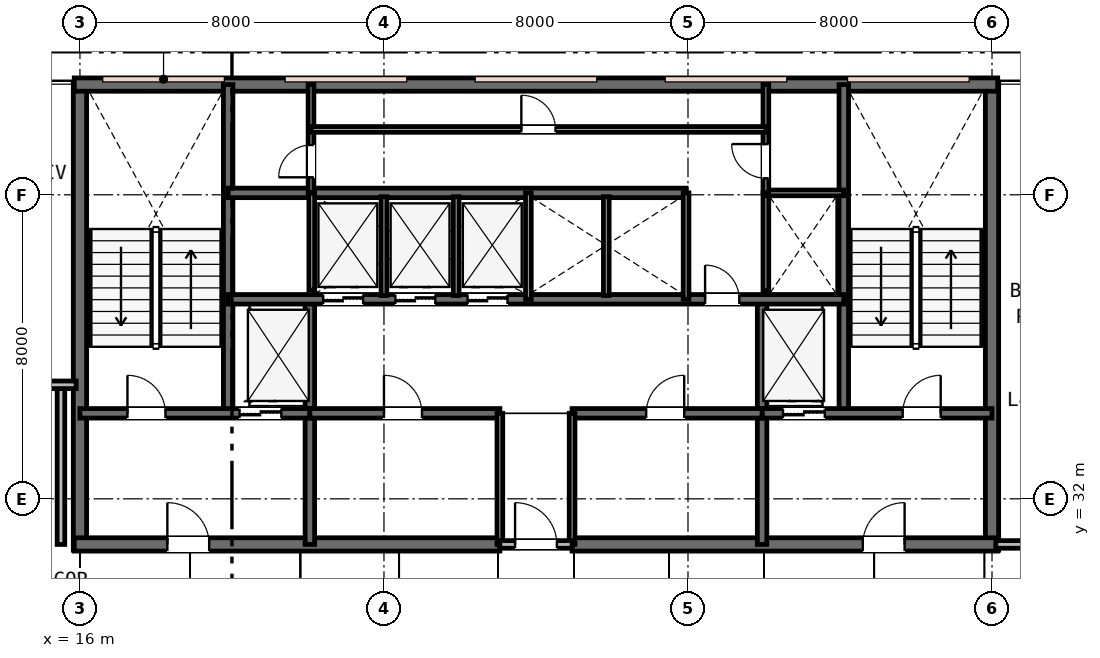
"""IFC4 building model, lengths in metres.
Left out: names, types, materials, properties, quantities, classifications, styles, units other than length and angle.
Written with IfcOpenShell. Run it as: python <this file> out.ifc"""

import sys

from ifc_helpers import new_model, si_unit, direction, frame, frame_2d, origin, place, context, subcontext, project, spatial, rectangle, extrude, element, fill, save


model = new_model("IFC4")
c1 = context("Model", 3, precision=1e-05, world=origin(), true_north=direction((0.0, 1.0)))
c2 = subcontext(c1, "Body", "Model", "MODEL_VIEW")
j1 = project(units=[si_unit("LENGTHUNIT", "METRE"), si_unit("PLANEANGLEUNIT", "RADIAN")], contexts=[c1])
p1 = place(None, origin())
s1 = spatial("IfcSite", under=j1, at=p1, CompositionType="ELEMENT")
p2 = place(p1, origin())
s2 = spatial("IfcBuilding", under=s1, at=p2, CompositionType="ELEMENT")
p3 = place(p2, frame((0.0, 0.0, 172.2)))
s3 = spatial("IfcBuildingStorey", under=s2, at=p3, CompositionType="ELEMENT", Elevation=172.2)
for number, where, z_axis, x_axis in (
    (1, (16.0, 30.65, 0.0), (0.0, 0.0, 1.0), (0.0, 1.0, 0.0)),
    (2, (40.0, 30.65, 0.0), (0.0, 0.0, 1.0), (0.0, 1.0, 0.0)),
):
    element("IfcWall", number, at=place(p3, frame(where, z_axis=z_axis, x_axis=x_axis)), inside=s3, PredefinedType="SHEAR", context=c2, shape_type="SweptSolid", body=[
        extrude(rectangle(XDim=12.3, YDim=0.35, at=frame_2d((6.15, 0.0))), origin(), (0.0, 0.0, 1.0), 3.6),
    ])
p4 = place(p3, frame((15.85, 42.9, 0.0), z_axis=(0.0, 0.0, 1.0), x_axis=(1.0, 0.0, 0.0)))
e3 = element("IfcWall", 3, at=p4, inside=s3, PredefinedType="SHEAR", context=c2, shape_type="SweptSolid", body=[
    extrude(rectangle(XDim=24.3, YDim=0.35, at=frame_2d((12.15, 0.0))), origin(), (0.0, 0.0, 1.0), 3.6),
])
p5 = place(p3, frame((15.85, 30.8, 0.0), z_axis=(0.0, 0.0, 1.0), x_axis=(1.0, 0.0, 0.0)))
e4 = element("IfcWall", 4, at=p5, inside=s3, PredefinedType="SHEAR", context=c2, shape_type="SweptSolid", body=[
    extrude(rectangle(XDim=11.2, YDim=0.35, at=frame_2d((5.6, 0.0))), origin(), (0.0, 0.0, 1.0), 3.6),
])
p6 = place(p5, frame((2.45, 0.0, 0.0)))
e5 = element("IfcOpeningElement", 5, at=p6, cuts=e4, PredefinedType="OPENING", context=c2, shape_type="SweptSolid", body=[
    extrude(rectangle(XDim=1.1, YDim=2.15, at=frame_2d((0.55, 1.075))), frame((0.0, 0.185, 0.0), z_axis=(0.0, -1.0, 0.0), x_axis=(1.0, 0.0, 0.0)), (0.0, 0.0, 1.0), 0.37),
])
p7 = place(p3, frame((28.95, 30.8, 0.0), z_axis=(0.0, 0.0, 1.0), x_axis=(1.0, 0.0, 0.0)))
e6 = element("IfcWall", 6, at=p7, inside=s3, PredefinedType="SHEAR", context=c2, shape_type="SweptSolid", body=[
    extrude(rectangle(XDim=11.2, YDim=0.35, at=frame_2d((5.6, 0.0))), origin(), (0.0, 0.0, 1.0), 3.6),
])
p8 = place(p7, frame((7.65, 0.0, 0.0)))
e7 = element("IfcOpeningElement", 7, at=p8, cuts=e6, PredefinedType="OPENING", context=c2, shape_type="SweptSolid", body=[
    extrude(rectangle(XDim=1.1, YDim=2.15, at=frame_2d((0.55, 1.075))), frame((0.0, 0.185, 0.0), z_axis=(0.0, -1.0, 0.0), x_axis=(1.0, 0.0, 0.0)), (0.0, 0.0, 1.0), 0.37),
])
for number, where, z_axis, x_axis in (
    (8, (19.9, 34.25, 0.0), (0.0, 0.0, 1.0), (0.0, 1.0, 0.0)),
    (9, (36.1, 34.25, 0.0), (0.0, 0.0, 1.0), (0.0, 1.0, 0.0)),
):
    element("IfcWall", number, at=place(p3, frame(where, z_axis=z_axis, x_axis=x_axis)), inside=s3, PredefinedType="SHEAR", context=c2, shape_type="SweptSolid", body=[
        extrude(rectangle(XDim=8.65, YDim=0.25, at=frame_2d((4.325, 0.0))), origin(), (0.0, 0.0, 1.0), 3.6),
    ])
for number, where, z_axis, x_axis in (
    (10, (22.05, 30.8, 0.0), (0.0, 0.0, 1.0), (0.0, 1.0, 0.0)),
    (11, (33.95, 30.8, 0.0), (0.0, 0.0, 1.0), (0.0, 1.0, 0.0)),
):
    element("IfcWall", number, at=place(p3, frame(where, z_axis=z_axis, x_axis=x_axis)), inside=s3, PredefinedType="SHEAR", context=c2, shape_type="SweptSolid", body=[
        extrude(rectangle(XDim=6.45, YDim=0.25, at=frame_2d((3.225, 0.0))), origin(), (0.0, 0.0, 1.0), 3.6),
    ])
p9 = place(p3, frame((16.0, 34.25, 0.0), z_axis=(0.0, 0.0, 1.0), x_axis=(1.0, 0.0, 0.0)))
e12 = element("IfcWall", 12, at=p9, inside=s3, PredefinedType="SHEAR", context=c2, shape_type="SweptSolid", body=[
    extrude(rectangle(XDim=6.05, YDim=0.25, at=frame_2d((3.025, 0.0))), origin(), (0.0, 0.0, 1.0), 3.6),
])
p10 = place(p9, frame((1.25, 0.0, 0.0)))
e13 = element("IfcOpeningElement", 13, at=p10, cuts=e12, PredefinedType="OPENING", context=c2, shape_type="SweptSolid", body=[
    extrude(rectangle(XDim=1.0, YDim=2.15, at=frame_2d((0.5, 1.075))), frame((0.0, 0.135, 0.0), z_axis=(0.0, -1.0, 0.0), x_axis=(1.0, 0.0, 0.0)), (0.0, 0.0, 1.0), 0.27),
])
p11 = place(p9, frame((4.2, 0.0, 0.0)))
e14 = element("IfcOpeningElement", 14, at=p11, cuts=e12, PredefinedType="OPENING", context=c2, shape_type="SweptSolid", body=[
    extrude(rectangle(XDim=1.1, YDim=2.15, at=frame_2d((0.55, 1.075))), frame((0.0, 0.135, 0.0), z_axis=(0.0, -1.0, 0.0), x_axis=(1.0, 0.0, 0.0)), (0.0, 0.0, 1.0), 0.27),
])
p12 = place(p3, frame((33.95, 34.25, 0.0), z_axis=(0.0, 0.0, 1.0), x_axis=(1.0, 0.0, 0.0)))
e15 = element("IfcWall", 15, at=p12, inside=s3, PredefinedType="SHEAR", context=c2, shape_type="SweptSolid", body=[
    extrude(rectangle(XDim=6.05, YDim=0.25, at=frame_2d((3.025, 0.0))), origin(), (0.0, 0.0, 1.0), 3.6),
])
p13 = place(p12, frame((3.7, 0.0, 0.0)))
e16 = element("IfcOpeningElement", 16, at=p13, cuts=e15, PredefinedType="OPENING", context=c2, shape_type="SweptSolid", body=[
    extrude(rectangle(XDim=1.0, YDim=2.15, at=frame_2d((0.5, 1.075))), frame((0.0, 0.135, 0.0), z_axis=(0.0, -1.0, 0.0), x_axis=(1.0, 0.0, 0.0)), (0.0, 0.0, 1.0), 0.27),
])
p14 = place(p12, frame((0.55, 0.0, 0.0)))
e17 = element("IfcOpeningElement", 17, at=p14, cuts=e15, PredefinedType="OPENING", context=c2, shape_type="SweptSolid", body=[
    extrude(rectangle(XDim=1.1, YDim=2.15, at=frame_2d((0.55, 1.075))), frame((0.0, 0.135, 0.0), z_axis=(0.0, -1.0, 0.0), x_axis=(1.0, 0.0, 0.0)), (0.0, 0.0, 1.0), 0.27),
])
p15 = place(p3, frame((22.05, 34.25, 0.0), z_axis=(0.0, 0.0, 1.0), x_axis=(1.0, 0.0, 0.0)))
e18 = element("IfcWall", 18, at=p15, inside=s3, PredefinedType="SHEAR", context=c2, shape_type="SweptSolid", body=[
    extrude(rectangle(XDim=5.0, YDim=0.25, at=frame_2d((2.5, 0.0))), origin(), (0.0, 0.0, 1.0), 3.6),
])
p16 = place(p15, frame((1.95, 0.0, 0.0)))
e19 = element("IfcOpeningElement", 19, at=p16, cuts=e18, PredefinedType="OPENING", context=c2, shape_type="SweptSolid", body=[
    extrude(rectangle(XDim=1.0, YDim=2.15, at=frame_2d((0.5, 1.075))), frame((0.0, 0.135, 0.0), z_axis=(0.0, -1.0, 0.0), x_axis=(1.0, 0.0, 0.0)), (0.0, 0.0, 1.0), 0.27),
])
p17 = place(p3, frame((28.95, 34.25, 0.0), z_axis=(0.0, 0.0, 1.0), x_axis=(1.0, 0.0, 0.0)))
e20 = element("IfcWall", 20, at=p17, inside=s3, PredefinedType="SHEAR", context=c2, shape_type="SweptSolid", body=[
    extrude(rectangle(XDim=5.0, YDim=0.25, at=frame_2d((2.5, 0.0))), origin(), (0.0, 0.0, 1.0), 3.6),
])
p18 = place(p17, frame((1.95, 0.0, 0.0)))
e21 = element("IfcOpeningElement", 21, at=p18, cuts=e20, PredefinedType="OPENING", context=c2, shape_type="SweptSolid", body=[
    extrude(rectangle(XDim=1.0, YDim=2.15, at=frame_2d((0.5, 1.075))), frame((0.0, 0.135, 0.0), z_axis=(0.0, -1.0, 0.0), x_axis=(1.0, 0.0, 0.0)), (0.0, 0.0, 1.0), 0.27),
])
p19 = place(p3, frame((19.9, 37.25, 0.0), z_axis=(0.0, 0.0, 1.0), x_axis=(1.0, 0.0, 0.0)))
e22 = element("IfcWall", 22, at=p19, inside=s3, PredefinedType="SHEAR", context=c2, shape_type="SweptSolid", body=[
    extrude(rectangle(XDim=16.2, YDim=0.25, at=frame_2d((8.1, 0.0))), origin(), (0.0, 0.0, 1.0), 3.6),
])
p20 = place(p19, frame((12.55, 0.0, 0.0)))
e23 = element("IfcOpeningElement", 23, at=p20, cuts=e22, PredefinedType="OPENING", context=c2, shape_type="SweptSolid", body=[
    extrude(rectangle(XDim=0.9, YDim=2.15, at=frame_2d((0.45, 1.075))), frame((0.0, 0.135, 0.0), z_axis=(0.0, -1.0, 0.0), x_axis=(1.0, 0.0, 0.0)), (0.0, 0.0, 1.0), 0.27),
])
p21 = place(p19, frame((2.5, 0.0, 0.0)))
e24 = element("IfcOpeningElement", 24, at=p21, cuts=e22, PredefinedType="OPENING", context=c2, shape_type="SweptSolid", body=[
    extrude(rectangle(XDim=1.05, YDim=2.15, at=frame_2d((0.525, 1.075))), frame((0.0, 0.135, 0.0), z_axis=(0.0, -1.0, 0.0), x_axis=(1.0, 0.0, 0.0)), (0.0, 0.0, 1.0), 0.27),
])
p22 = place(p19, frame((4.4, 0.0, 0.0)))
e25 = element("IfcOpeningElement", 25, at=p22, cuts=e22, PredefinedType="OPENING", context=c2, shape_type="SweptSolid", body=[
    extrude(rectangle(XDim=1.05, YDim=2.15, at=frame_2d((0.525, 1.075))), frame((0.0, 0.135, 0.0), z_axis=(0.0, -1.0, 0.0), x_axis=(1.0, 0.0, 0.0)), (0.0, 0.0, 1.0), 0.27),
])
p23 = place(p19, frame((6.3, 0.0, 0.0)))
e26 = element("IfcOpeningElement", 26, at=p23, cuts=e22, PredefinedType="OPENING", context=c2, shape_type="SweptSolid", body=[
    extrude(rectangle(XDim=1.05, YDim=2.15, at=frame_2d((0.525, 1.075))), frame((0.0, 0.135, 0.0), z_axis=(0.0, -1.0, 0.0), x_axis=(1.0, 0.0, 0.0)), (0.0, 0.0, 1.0), 0.27),
])
p24 = place(p3, frame((19.9, 40.05, 0.0), z_axis=(0.0, 0.0, 1.0), x_axis=(1.0, 0.0, 0.0)))
e27 = element("IfcWall", 27, at=p24, inside=s3, PredefinedType="SHEAR", context=c2, shape_type="SweptSolid", body=[
    extrude(rectangle(XDim=12.05, YDim=0.25, at=frame_2d((6.025, 0.0))), origin(), (0.0, 0.0, 1.0), 3.6),
])
for number, where, z_axis, x_axis in (
    (28, (27.05, 30.8, 0.0), (0.0, 0.0, 1.0), (0.0, 1.0, 0.0)),
    (29, (28.95, 30.8, 0.0), (0.0, 0.0, 1.0), (0.0, 1.0, 0.0)),
):
    element("IfcWall", number, at=place(p3, frame(where, z_axis=z_axis, x_axis=x_axis)), inside=s3, PredefinedType="PLUMBINGWALL", context=c2, shape_type="SweptSolid", body=[
        extrude(rectangle(XDim=3.45, YDim=0.15, at=frame_2d((1.725, 0.0))), origin(), (0.0, 0.0, 1.0), 3.07),
    ])
p25 = place(p3, frame((27.05, 30.8, 0.0), z_axis=(0.0, 0.0, 1.0), x_axis=(1.0, 0.0, 0.0)))
e30 = element("IfcWall", 30, at=p25, inside=s3, PredefinedType="PARTITIONING", context=c2, shape_type="SweptSolid", body=[
    extrude(rectangle(XDim=1.9, YDim=0.2, at=frame_2d((0.95, 0.0))), origin(), (0.0, 0.0, 1.0), 3.07),
])
p26 = place(p25, frame((0.4, 0.0, 0.0)))
e31 = element("IfcOpeningElement", 31, at=p26, cuts=e30, PredefinedType="OPENING", context=c2, shape_type="SweptSolid", body=[
    extrude(rectangle(XDim=1.1, YDim=2.15, at=frame_2d((0.55, 1.075))), frame((0.0, 0.11, 0.0), z_axis=(0.0, -1.0, 0.0), x_axis=(1.0, 0.0, 0.0)), (0.0, 0.0, 1.0), 0.22),
])
p27 = place(p3, frame((22.1, 37.49, 0.0), z_axis=(0.0, 0.0, 1.0), x_axis=(0.0, 1.0, 0.0)))
e32 = element("IfcWall", 32, at=p27, inside=s3, PredefinedType="PLUMBINGWALL", context=c2, shape_type="SweptSolid", body=[
    extrude(rectangle(XDim=2.56, YDim=0.15, at=frame_2d((1.28, 0.0))), origin(), (0.0, 0.0, 1.0), 3.33),
])
p28 = place(p3, frame((27.8, 37.25, 0.0), z_axis=(0.0, 0.0, 1.0), x_axis=(0.0, 1.0, 0.0)))
e33 = element("IfcWall", 33, at=p28, inside=s3, PredefinedType="PLUMBINGWALL", context=c2, shape_type="SweptSolid", body=[
    extrude(rectangle(XDim=2.8, YDim=0.15, at=frame_2d((1.4, 0.0))), origin(), (0.0, 0.0, 1.0), 3.33),
])
for number, where, z_axis, x_axis in (
    (34, (24.0, 37.35, 0.0), (0.0, 0.0, 1.0), (0.0, 1.0, 0.0)),
    (35, (25.9, 37.35, 0.0), (0.0, 0.0, 1.0), (0.0, 1.0, 0.0)),
):
    element("IfcWall", number, at=place(p3, frame(where, z_axis=z_axis, x_axis=x_axis)), inside=s3, PredefinedType="PLUMBINGWALL", context=c2, shape_type="SweptSolid", body=[
        extrude(rectangle(XDim=2.6, YDim=0.15, at=frame_2d((1.3, 0.0))), origin(), (0.0, 0.0, 1.0), 3.33),
    ])
p29 = place(p3, frame((31.95, 37.25, 0.0), z_axis=(0.0, 0.0, 1.0), x_axis=(0.0, 1.0, 0.0)))
e36 = element("IfcWall", 36, at=p29, inside=s3, PredefinedType="PLUMBINGWALL", context=c2, shape_type="SweptSolid", body=[
    extrude(rectangle(XDim=2.8, YDim=0.15, at=frame_2d((1.4, 0.0))), origin(), (0.0, 0.0, 1.0), 3.33),
])
p30 = place(p3, frame((29.85, 37.35, 0.0), z_axis=(0.0, 0.0, 1.0), x_axis=(0.0, 1.0, 0.0)))
e37 = element("IfcWall", 37, at=p30, inside=s3, PredefinedType="PLUMBINGWALL", context=c2, shape_type="SweptSolid", body=[
    extrude(rectangle(XDim=2.6, YDim=0.15, at=frame_2d((1.3, 0.0))), origin(), (0.0, 0.0, 1.0), 3.33),
])
p31 = place(p3, frame((34.05, 37.473, 0.0), z_axis=(0.0, 0.0, 1.0), x_axis=(0.0, 1.0, 0.0)))
e38 = element("IfcWall", 38, at=p31, inside=s3, PredefinedType="PLUMBINGWALL", context=c2, shape_type="SweptSolid", body=[
    extrude(rectangle(XDim=2.577, YDim=0.15, at=frame_2d((1.288, 0.0))), origin(), (0.0, 0.0, 1.0), 3.33),
])
p32 = place(p3, frame((34.05, 40.05, 0.0), z_axis=(0.0, 0.0, 1.0), x_axis=(1.0, 0.0, 0.0)))
e39 = element("IfcWall", 39, at=p32, inside=s3, PredefinedType="PARTITIONING", context=c2, shape_type="SweptSolid", body=[
    extrude(rectangle(XDim=2.05, YDim=0.15, at=frame_2d((1.025, 0.0))), origin(), (0.0, 0.0, 1.0), 3.33),
])
p33 = place(p3, frame((34.05, 40.05, 0.0), z_axis=(0.0, 0.0, 1.0), x_axis=(0.0, 1.0, 0.0)))
e40 = element("IfcWall", 40, at=p33, inside=s3, PredefinedType="PARTITIONING", context=c2, shape_type="SweptSolid", body=[
    extrude(rectangle(XDim=2.85, YDim=0.15, at=frame_2d((1.425, 0.0))), origin(), (0.0, 0.0, 1.0), 3.33),
])
p34 = place(p33, frame((0.385, 0.0, 0.0)))
e41 = element("IfcOpeningElement", 41, at=p34, cuts=e40, PredefinedType="OPENING", context=c2, shape_type="SweptSolid", body=[
    extrude(rectangle(XDim=0.9, YDim=2.15, at=frame_2d((0.45, 1.075))), frame((0.0, 0.085, 0.0), z_axis=(0.0, -1.0, 0.0), x_axis=(1.0, 0.0, 0.0)), (0.0, 0.0, 1.0), 0.17),
])
p35 = place(p3, frame((22.08, 40.05, 0.0), z_axis=(0.0, 0.0, 1.0), x_axis=(0.0, 1.0, 0.0)))
e42 = element("IfcWall", 42, at=p35, inside=s3, PredefinedType="PARTITIONING", context=c2, shape_type="SweptSolid", body=[
    extrude(rectangle(XDim=2.85, YDim=0.15, at=frame_2d((1.425, 0.0))), origin(), (0.0, 0.0, 1.0), 3.33),
])
p36 = place(p35, frame((0.41, 0.0, 0.0)))
e43 = element("IfcOpeningElement", 43, at=p36, cuts=e42, PredefinedType="OPENING", context=c2, shape_type="SweptSolid", body=[
    extrude(rectangle(XDim=0.85, YDim=2.15, at=frame_2d((0.425, 1.075))), frame((0.0, 0.085, 0.0), z_axis=(0.0, -1.0, 0.0), x_axis=(1.0, 0.0, 0.0)), (0.0, 0.0, 1.0), 0.17),
])
p37 = place(p3, frame((22.08, 41.72, 0.0), z_axis=(0.0, 0.0, 1.0), x_axis=(1.0, 0.0, 0.0)))
e44 = element("IfcWall", 44, at=p37, inside=s3, PredefinedType="PARTITIONING", context=c2, shape_type="SweptSolid", body=[
    extrude(rectangle(XDim=11.97, YDim=0.15, at=frame_2d((5.985, 0.0))), origin(), (0.0, 0.0, 1.0), 3.33),
])
p38 = place(p37, frame((5.535, 0.0, 0.0)))
e45 = element("IfcOpeningElement", 45, at=p38, cuts=e44, PredefinedType="OPENING", context=c2, shape_type="SweptSolid", body=[
    extrude(rectangle(XDim=0.9, YDim=2.15, at=frame_2d((0.45, 1.075))), frame((0.0, 0.085, 0.0), z_axis=(0.0, -1.0, 0.0), x_axis=(1.0, 0.0, 0.0)), (0.0, 0.0, 1.0), 0.17),
])
p39 = place(p3, frame((15.5, 30.8, 0.0), z_axis=(0.0, 0.0, 1.0), x_axis=(0.0, 1.0, 0.0)))
e46 = element("IfcWall", 46, at=p39, inside=s3, PredefinedType="PARTITIONING", context=c2, shape_type="SweptSolid", body=[
    extrude(rectangle(XDim=4.2, YDim=0.2, at=frame_2d((2.1, 0.0))), origin(), (0.0, 0.0, 1.0), 2.92),
])
p40 = place(p3, frame((5.1, 35.0, 0.0), z_axis=(0.0, 0.0, 1.0), x_axis=(1.0, 0.0, 0.0)))
e47 = element("IfcWall", 47, at=p40, inside=s3, PredefinedType="PARTITIONING", context=c2, shape_type="SweptSolid", body=[
    extrude(rectangle(XDim=10.8, YDim=0.2, at=frame_2d((5.4, 0.0))), origin(), (0.0, 0.0, 1.0), 3.02),
])
p41 = place(p40, frame((6.964, 0.0, 0.0)))
e48 = element("IfcOpeningElement", 48, at=p41, cuts=e47, PredefinedType="OPENING", context=c2, shape_type="SweptSolid", body=[
    extrude(rectangle(XDim=0.95, YDim=2.15, at=frame_2d((0.475, 1.075))), frame((0.0, 0.11, 0.0), z_axis=(0.0, -1.0, 0.0), x_axis=(1.0, 0.0, 0.0)), (0.0, 0.0, 1.0), 0.22),
])
p42 = place(p3, frame((40.1, 30.8, 0.0), z_axis=(0.0, 0.0, 1.0), x_axis=(1.0, 0.0, 0.0)))
e49 = element("IfcWall", 49, at=p42, inside=s3, PredefinedType="PARTITIONING", context=c2, shape_type="SweptSolid", body=[
    extrude(rectangle(XDim=4.1, YDim=0.2, at=frame_2d((2.05, 0.0))), origin(), (0.0, 0.0, 1.0), 2.92),
])
p43 = place(p42, frame((1.575, 0.0, 0.0)))
e50 = element("IfcOpeningElement", 50, at=p43, cuts=e49, PredefinedType="OPENING", context=c2, shape_type="SweptSolid", body=[
    extrude(rectangle(XDim=0.95, YDim=2.15, at=frame_2d((0.475, 1.075))), frame((0.0, 0.11, 0.0), z_axis=(0.0, -1.0, 0.0), x_axis=(1.0, 0.0, 0.0)), (0.0, 0.0, 1.0), 0.22),
])
p44 = place(p26, origin())
e51 = element("IfcDoor", 51, at=p44, inside=s3, OperationType="SINGLE_SWING_LEFT", PredefinedType="DOOR", context=c2, shape_type="SweptSolid", body=[
    extrude(rectangle(XDim=1.1, YDim=2.15, at=frame_2d((0.55, 1.075))), frame((0.0, 0.025, 0.0), z_axis=(0.0, -1.0, 0.0), x_axis=(1.0, 0.0, 0.0)), (0.0, 0.0, 1.0), 0.05),
])
fill(e31, e51)
p45 = place(p10, origin())
e52 = element("IfcDoor", 52, at=p45, inside=s3, OperationType="SINGLE_SWING_LEFT", PredefinedType="DOOR", context=c2, shape_type="SweptSolid", body=[
    extrude(rectangle(XDim=1.0, YDim=2.15, at=frame_2d((0.5, 1.075))), frame((0.0, 0.025, 0.0), z_axis=(0.0, -1.0, 0.0), x_axis=(1.0, 0.0, 0.0)), (0.0, 0.0, 1.0), 0.05),
])
fill(e13, e52)
p46 = place(p13, origin())
e53 = element("IfcDoor", 53, at=p46, inside=s3, OperationType="SINGLE_SWING_RIGHT", PredefinedType="DOOR", context=c2, shape_type="SweptSolid", body=[
    extrude(rectangle(XDim=1.0, YDim=2.15, at=frame_2d((0.5, 1.075))), frame((0.0, 0.025, 0.0), z_axis=(0.0, -1.0, 0.0), x_axis=(1.0, 0.0, 0.0)), (0.0, 0.0, 1.0), 0.05),
])
fill(e16, e53)
p47 = place(p6, origin())
e54 = element("IfcDoor", 54, at=p47, inside=s3, OperationType="SINGLE_SWING_LEFT", PredefinedType="DOOR", context=c2, shape_type="SweptSolid", body=[
    extrude(rectangle(XDim=1.1, YDim=2.15, at=frame_2d((0.55, 1.075))), frame((0.0, 0.025, 0.0), z_axis=(0.0, -1.0, 0.0), x_axis=(1.0, 0.0, 0.0)), (0.0, 0.0, 1.0), 0.05),
])
fill(e5, e54)
p48 = place(p8, origin())
e55 = element("IfcDoor", 55, at=p48, inside=s3, OperationType="SINGLE_SWING_RIGHT", PredefinedType="DOOR", context=c2, shape_type="SweptSolid", body=[
    extrude(rectangle(XDim=1.1, YDim=2.15, at=frame_2d((0.55, 1.075))), frame((0.0, 0.025, 0.0), z_axis=(0.0, -1.0, 0.0), x_axis=(1.0, 0.0, 0.0)), (0.0, 0.0, 1.0), 0.05),
])
fill(e7, e55)
p49 = place(p16, origin())
e56 = element("IfcDoor", 56, at=p49, inside=s3, OperationType="SINGLE_SWING_LEFT", PredefinedType="DOOR", context=c2, shape_type="SweptSolid", body=[
    extrude(rectangle(XDim=1.0, YDim=2.15, at=frame_2d((0.5, 1.075))), frame((0.0, 0.025, 0.0), z_axis=(0.0, -1.0, 0.0), x_axis=(1.0, 0.0, 0.0)), (0.0, 0.0, 1.0), 0.05),
])
fill(e19, e56)
p50 = place(p18, origin())
e57 = element("IfcDoor", 57, at=p50, inside=s3, OperationType="SINGLE_SWING_RIGHT", PredefinedType="DOOR", context=c2, shape_type="SweptSolid", body=[
    extrude(rectangle(XDim=1.0, YDim=2.15, at=frame_2d((0.5, 1.075))), frame((0.0, 0.025, 0.0), z_axis=(0.0, -1.0, 0.0), x_axis=(1.0, 0.0, 0.0)), (0.0, 0.0, 1.0), 0.05),
])
fill(e21, e57)
p51 = place(p20, origin())
e58 = element("IfcDoor", 58, at=p51, inside=s3, OperationType="SINGLE_SWING_LEFT", PredefinedType="DOOR", context=c2, shape_type="SweptSolid", body=[
    extrude(rectangle(XDim=0.9, YDim=2.15, at=frame_2d((0.45, 1.075))), frame((0.0, 0.025, 0.0), z_axis=(0.0, -1.0, 0.0), x_axis=(1.0, 0.0, 0.0)), (0.0, 0.0, 1.0), 0.05),
])
fill(e23, e58)
p52 = place(p34, origin())
e59 = element("IfcDoor", 59, at=p52, inside=s3, OperationType="SINGLE_SWING_RIGHT", PredefinedType="DOOR", context=c2, shape_type="SweptSolid", body=[
    extrude(rectangle(XDim=0.9, YDim=2.15, at=frame_2d((0.45, 1.075))), frame((0.0, 0.025, 0.0), z_axis=(0.0, -1.0, 0.0), x_axis=(1.0, 0.0, 0.0)), (0.0, 0.0, 1.0), 0.05),
])
fill(e41, e59)
p53 = place(p36, origin())
e60 = element("IfcDoor", 60, at=p53, inside=s3, OperationType="SINGLE_SWING_LEFT", PredefinedType="DOOR", context=c2, shape_type="SweptSolid", body=[
    extrude(rectangle(XDim=0.85, YDim=2.15, at=frame_2d((0.425, 1.075))), frame((0.0, 0.025, 0.0), z_axis=(0.0, -1.0, 0.0), x_axis=(1.0, 0.0, 0.0)), (0.0, 0.0, 1.0), 0.05),
])
fill(e43, e60)
p54 = place(p38, origin())
e61 = element("IfcDoor", 61, at=p54, inside=s3, OperationType="SINGLE_SWING_LEFT", PredefinedType="DOOR", context=c2, shape_type="SweptSolid", body=[
    extrude(rectangle(XDim=0.9, YDim=2.15, at=frame_2d((0.45, 1.075))), frame((0.0, 0.025, 0.0), z_axis=(0.0, -1.0, 0.0), x_axis=(1.0, 0.0, 0.0)), (0.0, 0.0, 1.0), 0.05),
])
fill(e45, e61)
p55 = place(p11, origin())
e62 = element("IfcDoor", 62, at=p55, inside=s3, OperationType="DOUBLE_DOOR_SLIDING", PredefinedType="DOOR", context=c2, shape_type="SweptSolid", body=[
    extrude(rectangle(XDim=1.1, YDim=2.15, at=frame_2d((0.55, 1.075))), frame((0.0, 0.025, 0.0), z_axis=(0.0, -1.0, 0.0), x_axis=(1.0, 0.0, 0.0)), (0.0, 0.0, 1.0), 0.05),
])
fill(e14, e62)
p56 = place(p14, origin())
e63 = element("IfcDoor", 63, at=p56, inside=s3, OperationType="DOUBLE_DOOR_SLIDING", PredefinedType="DOOR", context=c2, shape_type="SweptSolid", body=[
    extrude(rectangle(XDim=1.1, YDim=2.15, at=frame_2d((0.55, 1.075))), frame((0.0, 0.025, 0.0), z_axis=(0.0, -1.0, 0.0), x_axis=(1.0, 0.0, 0.0)), (0.0, 0.0, 1.0), 0.05),
])
fill(e17, e63)
p57 = place(p21, origin())
e64 = element("IfcDoor", 64, at=p57, inside=s3, OperationType="DOUBLE_DOOR_SLIDING", PredefinedType="DOOR", context=c2, shape_type="SweptSolid", body=[
    extrude(rectangle(XDim=1.05, YDim=2.15, at=frame_2d((0.525, 1.075))), frame((0.0, 0.025, 0.0), z_axis=(0.0, -1.0, 0.0), x_axis=(1.0, 0.0, 0.0)), (0.0, 0.0, 1.0), 0.05),
])
fill(e24, e64)
p58 = place(p22, origin())
e65 = element("IfcDoor", 65, at=p58, inside=s3, OperationType="DOUBLE_DOOR_SLIDING", PredefinedType="DOOR", context=c2, shape_type="SweptSolid", body=[
    extrude(rectangle(XDim=1.05, YDim=2.15, at=frame_2d((0.525, 1.075))), frame((0.0, 0.025, 0.0), z_axis=(0.0, -1.0, 0.0), x_axis=(1.0, 0.0, 0.0)), (0.0, 0.0, 1.0), 0.05),
])
fill(e25, e65)
p59 = place(p23, origin())
e66 = element("IfcDoor", 66, at=p59, inside=s3, OperationType="DOUBLE_DOOR_SLIDING", PredefinedType="DOOR", context=c2, shape_type="SweptSolid", body=[
    extrude(rectangle(XDim=1.05, YDim=2.15, at=frame_2d((0.525, 1.075))), frame((0.0, 0.025, 0.0), z_axis=(0.0, -1.0, 0.0), x_axis=(1.0, 0.0, 0.0)), (0.0, 0.0, 1.0), 0.05),
])
fill(e26, e66)
save(model, sys.argv[1])
